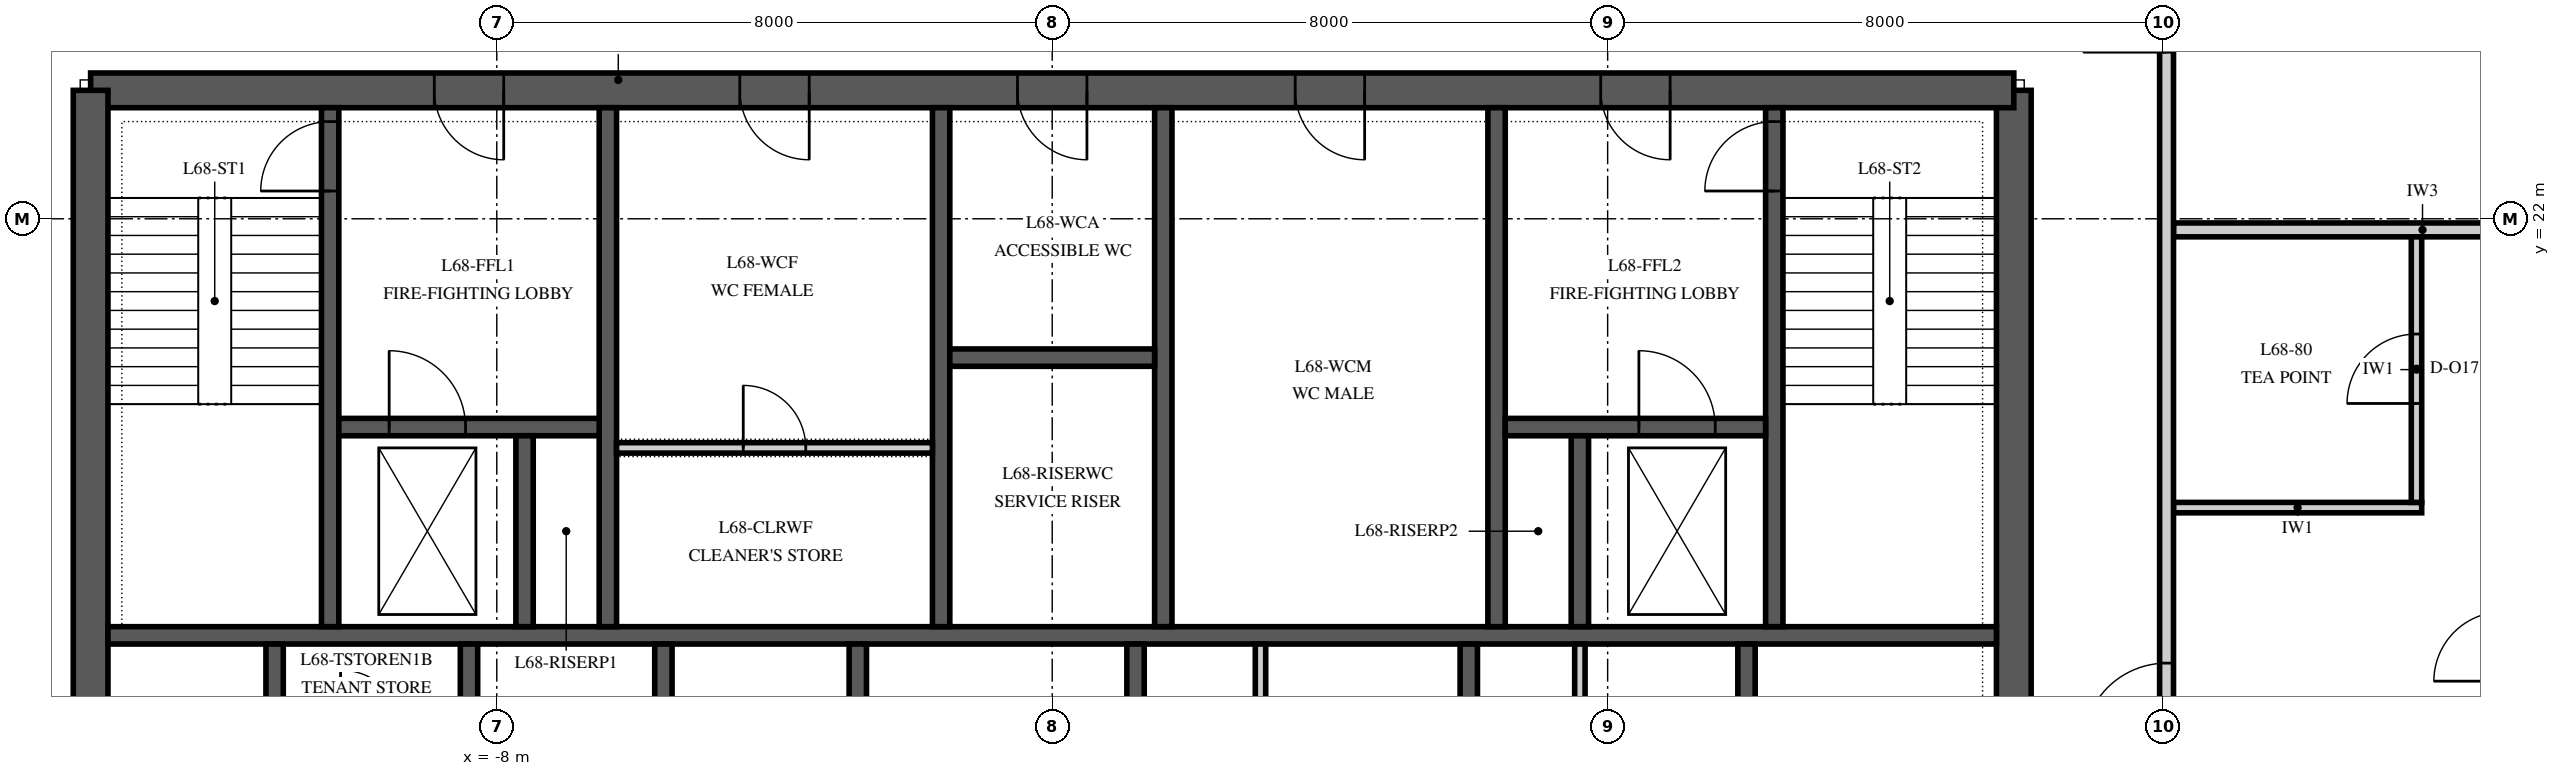
"""IFC4 building model, lengths in metres.
Left out: names, types, materials, properties, quantities, classifications, styles, units other than length and angle.
Written with IfcOpenShell. Run it as: python <this file> out.ifc"""

import sys

from ifc_helpers import new_model, si_unit, direction, frame, frame_2d, origin, place, context, subcontext, project, spatial, polyline, rectangle, outline, extrude, element, fill, save


model = new_model("IFC4")
c1 = context("Model", 3, precision=1e-05, world=origin(), true_north=direction((0.0, 1.0)))
c2 = subcontext(c1, "Body", "Model", "MODEL_VIEW")
j1 = project(units=[si_unit("LENGTHUNIT", "METRE"), si_unit("PLANEANGLEUNIT", "RADIAN")], contexts=[c1])
p1 = place(None, origin())
s1 = spatial("IfcSite", under=j1, at=p1, CompositionType="ELEMENT")
p2 = place(p1, origin())
s2 = spatial("IfcBuilding", under=s1, at=p2, CompositionType="ELEMENT")
p3 = place(p2, frame((0.0, 0.0, 292.0)))
s3 = spatial("IfcBuildingStorey", under=s2, at=p3, CompositionType="ELEMENT", Elevation=292.0)
p4 = place(p3, frame((13.85, 6.15, 0.0), z_axis=(0.0, 0.0, 1.0), x_axis=(0.0, 1.0, 0.0)))
e1 = element("IfcWall", 1, at=p4, inside=s3, PredefinedType="SHEAR", context=c2, shape_type="SweptSolid", body=[
    extrude(outline(polyline([(0.0, -0.25), (17.7, -0.25), (17.7, 0.0), (17.45, 0.0), (17.45, 0.25), (0.25, 0.25), (0.25, 0.0), (0.0, 0.0), (0.0, -0.25)])), origin(), (0.0, 0.0, 1.0), 4.0),
])
p5 = place(p4, frame((4.15, 0.0, 0.0)))
e2 = element("IfcOpeningElement", 2, at=p5, cuts=e1, PredefinedType="OPENING", context=c2, shape_type="SweptSolid", body=[
    extrude(rectangle(XDim=1.8, YDim=2.4, at=frame_2d((0.9, 1.2))), frame((0.0, 0.265, 0.0), z_axis=(0.0, -1.0, 0.0), x_axis=(1.0, 0.0, 0.0)), (0.0, 0.0, 1.0), 0.53),
])
p6 = place(p3, frame((13.85, 23.85, 0.0), z_axis=(0.0, 0.0, 1.0), x_axis=(-1.0, 0.0, 0.0)))
e3 = element("IfcWall", 3, at=p6, inside=s3, PredefinedType="SHEAR", context=c2, shape_type="SweptSolid", body=[
    extrude(rectangle(XDim=27.7, YDim=0.5, at=frame_2d((13.85, 0.0))), origin(), (0.0, 0.0, 1.0), 4.0),
])
p7 = place(p6, frame((21.75, 0.0, 0.0)))
e4 = element("IfcOpeningElement", 4, at=p7, cuts=e3, PredefinedType="OPENING", context=c2, shape_type="SweptSolid", body=[
    extrude(rectangle(XDim=1.0, YDim=2.1, at=frame_2d((0.5, 1.05))), frame((0.0, 0.265, 0.0), z_axis=(0.0, -1.0, 0.0), x_axis=(1.0, 0.0, 0.0)), (0.0, 0.0, 1.0), 0.53),
])
p8 = place(p6, frame((4.95, 0.0, 0.0)))
e5 = element("IfcOpeningElement", 5, at=p8, cuts=e3, PredefinedType="OPENING", context=c2, shape_type="SweptSolid", body=[
    extrude(rectangle(XDim=1.0, YDim=2.1, at=frame_2d((0.5, 1.05))), frame((0.0, 0.265, 0.0), z_axis=(0.0, -1.0, 0.0), x_axis=(1.0, 0.0, 0.0)), (0.0, 0.0, 1.0), 0.53),
])
p9 = place(p6, frame((17.35, 0.0, 0.0)))
e6 = element("IfcOpeningElement", 6, at=p9, cuts=e3, PredefinedType="OPENING", context=c2, shape_type="SweptSolid", body=[
    extrude(rectangle(XDim=1.0, YDim=2.1, at=frame_2d((0.5, 1.05))), frame((0.0, 0.265, 0.0), z_axis=(0.0, -1.0, 0.0), x_axis=(1.0, 0.0, 0.0)), (0.0, 0.0, 1.0), 0.53),
])
p10 = place(p6, frame((13.35, 0.0, 0.0)))
e7 = element("IfcOpeningElement", 7, at=p10, cuts=e3, PredefinedType="OPENING", context=c2, shape_type="SweptSolid", body=[
    extrude(rectangle(XDim=1.0, YDim=2.1, at=frame_2d((0.5, 1.05))), frame((0.0, 0.265, 0.0), z_axis=(0.0, -1.0, 0.0), x_axis=(1.0, 0.0, 0.0)), (0.0, 0.0, 1.0), 0.53),
])
p11 = place(p6, frame((9.35, 0.0, 0.0)))
e8 = element("IfcOpeningElement", 8, at=p11, cuts=e3, PredefinedType="OPENING", context=c2, shape_type="SweptSolid", body=[
    extrude(rectangle(XDim=1.0, YDim=2.1, at=frame_2d((0.5, 1.05))), frame((0.0, 0.265, 0.0), z_axis=(0.0, -1.0, 0.0), x_axis=(1.0, 0.0, 0.0)), (0.0, 0.0, 1.0), 0.53),
])
p12 = place(p3, frame((-13.85, 23.85, 0.0), z_axis=(0.0, 0.0, 1.0), x_axis=(0.0, -1.0, 0.0)))
e9 = element("IfcWall", 9, at=p12, inside=s3, PredefinedType="SHEAR", context=c2, shape_type="SweptSolid", body=[
    extrude(outline(polyline([(0.0, -0.25), (17.7, -0.25), (17.7, 0.0), (17.45, 0.0), (17.45, 0.25), (0.25, 0.25), (0.25, 0.0), (0.0, 0.0), (0.0, -0.25)])), origin(), (0.0, 0.0, 1.0), 4.0),
])
p13 = place(p12, frame((11.75, 0.0, 0.0)))
e10 = element("IfcOpeningElement", 10, at=p13, cuts=e9, PredefinedType="OPENING", context=c2, shape_type="SweptSolid", body=[
    extrude(rectangle(XDim=1.8, YDim=2.4, at=frame_2d((0.9, 1.2))), frame((0.0, 0.265, 0.0), z_axis=(0.0, -1.0, 0.0), x_axis=(1.0, 0.0, 0.0)), (0.0, 0.0, 1.0), 0.53),
])
p14 = place(p3, frame((-13.6, 16.0, 0.0), z_axis=(0.0, 0.0, 1.0), x_axis=(1.0, 0.0, 0.0)))
e11 = element("IfcWall", 11, at=p14, inside=s3, PredefinedType="SHEAR", context=c2, shape_type="SweptSolid", body=[
    extrude(rectangle(XDim=27.2, YDim=0.25, at=frame_2d((13.6, 0.0))), origin(), (0.0, 0.0, 1.0), 4.0),
])
for number, where, z_axis, x_axis in (
    (12, (-11.2, 13.125, 0.0), (0.0, 0.0, 1.0), (0.0, 1.0, 0.0)),
    (13, (-8.4, 13.125, 0.0), (0.0, 0.0, 1.0), (0.0, 1.0, 0.0)),
    (14, (-5.6, 13.125, 0.0), (0.0, 0.0, 1.0), (0.0, 1.0, 0.0)),
    (15, (-2.8, 13.125, 0.0), (0.0, 0.0, 1.0), (0.0, 1.0, 0.0)),
    (16, (1.2, 13.125, 0.0), (0.0, 0.0, 1.0), (0.0, 1.0, 0.0)),
    (17, (6.0, 13.125, 0.0), (0.0, 0.0, 1.0), (0.0, 1.0, 0.0)),
    (18, (10.0, 13.125, 0.0), (0.0, 0.0, 1.0), (0.0, 1.0, 0.0)),
):
    element("IfcWall", number, at=place(p3, frame(where, z_axis=z_axis, x_axis=x_axis)), inside=s3, PredefinedType="SHEAR", context=c2, shape_type="SweptSolid", body=[
        extrude(rectangle(XDim=2.75, YDim=0.25, at=frame_2d((1.375, 0.0))), origin(), (0.0, 0.0, 1.0), 4.0),
    ])
p15 = place(p3, frame((-10.4, 16.125, 0.0), z_axis=(0.0, 0.0, 1.0), x_axis=(0.0, 1.0, 0.0)))
e19 = element("IfcWall", 19, at=p15, inside=s3, PredefinedType="SHEAR", context=c2, shape_type="SweptSolid", body=[
    extrude(rectangle(XDim=7.475, YDim=0.25, at=frame_2d((3.738, 0.0))), origin(), (0.0, 0.0, 1.0), 4.0),
])
p16 = place(p15, frame((6.275, 0.0, 0.0)))
e20 = element("IfcOpeningElement", 20, at=p16, cuts=e19, PredefinedType="OPENING", context=c2, shape_type="SweptSolid", body=[
    extrude(rectangle(XDim=1.0, YDim=2.1, at=frame_2d((0.5, 1.05))), frame((0.0, 0.14, 0.0), z_axis=(0.0, -1.0, 0.0), x_axis=(1.0, 0.0, 0.0)), (0.0, 0.0, 1.0), 0.28),
])
for number, where, z_axis, x_axis in (
    (21, (-6.4, 16.125, 0.0), (0.0, 0.0, 1.0), (0.0, 1.0, 0.0)),
    (22, (-1.6, 16.125, 0.0), (0.0, 0.0, 1.0), (0.0, 1.0, 0.0)),
    (23, (1.6, 16.125, 0.0), (0.0, 0.0, 1.0), (0.0, 1.0, 0.0)),
    (24, (6.4, 16.125, 0.0), (0.0, 0.0, 1.0), (0.0, 1.0, 0.0)),
):
    element("IfcWall", number, at=place(p3, frame(where, z_axis=z_axis, x_axis=x_axis)), inside=s3, PredefinedType="SHEAR", context=c2, shape_type="SweptSolid", body=[
        extrude(rectangle(XDim=7.475, YDim=0.25, at=frame_2d((3.738, 0.0))), origin(), (0.0, 0.0, 1.0), 4.0),
    ])
p17 = place(p3, frame((10.4, 16.125, 0.0), z_axis=(0.0, 0.0, 1.0), x_axis=(0.0, 1.0, 0.0)))
e25 = element("IfcWall", 25, at=p17, inside=s3, PredefinedType="SHEAR", context=c2, shape_type="SweptSolid", body=[
    extrude(rectangle(XDim=7.475, YDim=0.25, at=frame_2d((3.738, 0.0))), origin(), (0.0, 0.0, 1.0), 4.0),
])
p18 = place(p17, frame((6.275, 0.0, 0.0)))
e26 = element("IfcOpeningElement", 26, at=p18, cuts=e25, PredefinedType="OPENING", context=c2, shape_type="SweptSolid", body=[
    extrude(rectangle(XDim=1.0, YDim=2.1, at=frame_2d((0.5, 1.05))), frame((0.0, 0.14, 0.0), z_axis=(0.0, -1.0, 0.0), x_axis=(1.0, 0.0, 0.0)), (0.0, 0.0, 1.0), 0.28),
])
p19 = place(p3, frame((-10.275, 19.0, 0.0), z_axis=(0.0, 0.0, 1.0), x_axis=(1.0, 0.0, 0.0)))
e27 = element("IfcWall", 27, at=p19, inside=s3, PredefinedType="SHEAR", context=c2, shape_type="SweptSolid", body=[
    extrude(rectangle(XDim=3.75, YDim=0.25, at=frame_2d((1.875, 0.0))), origin(), (0.0, 0.0, 1.0), 4.0),
])
p20 = place(p19, frame((0.725, 0.0, 0.0)))
e28 = element("IfcOpeningElement", 28, at=p20, cuts=e27, PredefinedType="OPENING", context=c2, shape_type="SweptSolid", body=[
    extrude(rectangle(XDim=1.1, YDim=2.1, at=frame_2d((0.55, 1.05))), frame((0.0, 0.14, 0.0), z_axis=(0.0, -1.0, 0.0), x_axis=(1.0, 0.0, 0.0)), (0.0, 0.0, 1.0), 0.28),
])
p21 = place(p3, frame((6.525, 19.0, 0.0), z_axis=(0.0, 0.0, 1.0), x_axis=(1.0, 0.0, 0.0)))
e29 = element("IfcWall", 29, at=p21, inside=s3, PredefinedType="SHEAR", context=c2, shape_type="SweptSolid", body=[
    extrude(rectangle(XDim=3.75, YDim=0.25, at=frame_2d((1.875, 0.0))), origin(), (0.0, 0.0, 1.0), 4.0),
])
p22 = place(p21, frame((1.925, 0.0, 0.0)))
e30 = element("IfcOpeningElement", 30, at=p22, cuts=e29, PredefinedType="OPENING", context=c2, shape_type="SweptSolid", body=[
    extrude(rectangle(XDim=1.1, YDim=2.1, at=frame_2d((0.55, 1.05))), frame((0.0, 0.14, 0.0), z_axis=(0.0, -1.0, 0.0), x_axis=(1.0, 0.0, 0.0)), (0.0, 0.0, 1.0), 0.28),
])
for number, where, z_axis, x_axis in (
    (31, (-7.6, 16.125, 0.0), (0.0, 0.0, 1.0), (0.0, 1.0, 0.0)),
    (32, (7.6, 16.125, 0.0), (0.0, 0.0, 1.0), (0.0, 1.0, 0.0)),
):
    element("IfcWall", number, at=place(p3, frame(where, z_axis=z_axis, x_axis=x_axis)), inside=s3, PredefinedType="SHEAR", context=c2, shape_type="SweptSolid", body=[
        extrude(rectangle(XDim=2.75, YDim=0.25, at=frame_2d((1.375, 0.0))), origin(), (0.0, 0.0, 1.0), 4.0),
    ])
p23 = place(p3, frame((-1.475, 20.0, 0.0), z_axis=(0.0, 0.0, 1.0), x_axis=(1.0, 0.0, 0.0)))
e33 = element("IfcWall", 33, at=p23, inside=s3, PredefinedType="SHEAR", context=c2, shape_type="SweptSolid", body=[
    extrude(rectangle(XDim=2.95, YDim=0.25, at=frame_2d((1.475, 0.0))), origin(), (0.0, 0.0, 1.0), 4.0),
])
p24 = place(p3, frame((-6.275, 18.7, 0.0), z_axis=(0.0, 0.0, 1.0), x_axis=(1.0, 0.0, 0.0)))
e34 = element("IfcWall", 34, at=p24, inside=s3, PredefinedType="PARTITIONING", context=c2, shape_type="SweptSolid", body=[
    extrude(rectangle(XDim=4.55, YDim=0.15, at=frame_2d((2.275, 0.0))), origin(), (0.0, 0.0, 1.0), 3.85),
])
p25 = place(p24, frame((1.825, 0.0, 0.0)))
e35 = element("IfcOpeningElement", 35, at=p25, cuts=e34, PredefinedType="OPENING", context=c2, shape_type="SweptSolid", body=[
    extrude(rectangle(XDim=0.9, YDim=2.1, at=frame_2d((0.45, 1.05))), frame((0.0, 0.09, 0.0), z_axis=(0.0, -1.0, 0.0), x_axis=(1.0, 0.0, 0.0)), (0.0, 0.0, 1.0), 0.18),
])
for number, where, z_axis, x_axis in (
    (36, (3.0, 13.125, 0.0), (0.0, 0.0, 1.0), (0.0, 1.0, 0.0)),
    (37, (7.6, 13.125, 0.0), (0.0, 0.0, 1.0), (0.0, 1.0, 0.0)),
):
    element("IfcWall", number, at=place(p3, frame(where, z_axis=z_axis, x_axis=x_axis)), inside=s3, PredefinedType="PARTITIONING", context=c2, shape_type="SweptSolid", body=[
        extrude(rectangle(XDim=2.75, YDim=0.15, at=frame_2d((1.375, 0.0))), origin(), (0.0, 0.0, 1.0), 3.85),
    ])
p26 = place(p3, frame((16.15, 17.84, 0.0), z_axis=(0.0, 0.0, 1.0), x_axis=(1.0, 0.0, 0.0)))
e38 = element("IfcWall", 38, at=p26, inside=s3, PredefinedType="PARTITIONING", context=c2, shape_type="SweptSolid", body=[
    extrude(rectangle(XDim=3.575, YDim=0.15, at=frame_2d((1.788, 0.0))), origin(), (0.0, 0.0, 1.0), 3.23),
])
p27 = place(p3, frame((16.15, 21.84, 0.0), z_axis=(0.0, 0.0, 1.0), x_axis=(1.0, 0.0, 0.0)))
e39 = element("IfcWall", 39, at=p27, inside=s3, PredefinedType="PARTITIONING", context=c2, shape_type="SweptSolid", body=[
    extrude(rectangle(XDim=7.174, YDim=0.2, at=frame_2d((3.587, 0.0))), origin(), (0.0, 0.0, 1.0), 3.23),
])
p28 = place(p3, frame((16.05, 4.05, 0.0), z_axis=(0.0, 0.0, 1.0), x_axis=(0.0, 1.0, 0.0)))
e40 = element("IfcWall", 40, at=p28, inside=s3, PredefinedType="PARTITIONING", context=c2, shape_type="SweptSolid", body=[
    extrude(rectangle(XDim=21.9, YDim=0.2, at=frame_2d((10.95, 0.0))), origin(), (0.0, 0.0, 1.0), 2.842),
])
p29 = place(p28, frame((20.35, 0.0, 0.0)))
e41 = element("IfcOpeningElement", 41, at=p29, cuts=e40, PredefinedType="OPENING", context=c2, shape_type="SweptSolid", body=[
    extrude(rectangle(XDim=1.2, YDim=2.4, at=frame_2d((0.6, 1.2))), frame((0.0, 0.115, 0.0), z_axis=(0.0, -1.0, 0.0), x_axis=(1.0, 0.0, 0.0)), (0.0, 0.0, 1.0), 0.23),
])
p30 = place(p28, frame((10.35, 0.0, 0.0)))
e42 = element("IfcOpeningElement", 42, at=p30, cuts=e40, PredefinedType="OPENING", context=c2, shape_type="SweptSolid", body=[
    extrude(rectangle(XDim=1.2, YDim=2.4, at=frame_2d((0.6, 1.2))), frame((0.0, 0.115, 0.0), z_axis=(0.0, -1.0, 0.0), x_axis=(1.0, 0.0, 0.0)), (0.0, 0.0, 1.0), 0.23),
])
p31 = place(p3, frame((19.65, 17.915, 0.0), z_axis=(0.0, 0.0, 1.0), x_axis=(0.0, 1.0, 0.0)))
e43 = element("IfcWall", 43, at=p31, inside=s3, PredefinedType="PARTITIONING", context=c2, shape_type="SweptSolid", body=[
    extrude(rectangle(XDim=3.825, YDim=0.15, at=frame_2d((1.913, 0.0))), origin(), (0.0, 0.0, 1.0), 3.23),
])
p32 = place(p31, frame((1.425, 0.0, 0.0)))
e44 = element("IfcOpeningElement", 44, at=p32, cuts=e43, PredefinedType="OPENING", context=c2, shape_type="SweptSolid", body=[
    extrude(rectangle(XDim=1.0, YDim=2.3, at=frame_2d((0.5, 1.15))), frame((0.0, 0.09, 0.0), z_axis=(0.0, -1.0, 0.0), x_axis=(1.0, 0.0, 0.0)), (0.0, 0.0, 1.0), 0.18),
])
p33 = place(p7, origin())
e45 = element("IfcDoor", 45, at=p33, inside=s3, OperationType="SINGLE_SWING_RIGHT", PredefinedType="DOOR", context=c2, shape_type="SweptSolid", body=[
    extrude(rectangle(XDim=1.0, YDim=2.1, at=frame_2d((0.5, 1.05))), frame((0.0, 0.25, 0.0), z_axis=(0.0, -1.0, 0.0), x_axis=(1.0, 0.0, 0.0)), (0.0, 0.0, 1.0), 0.5),
])
fill(e4, e45)
p34 = place(p8, origin())
e46 = element("IfcDoor", 46, at=p34, inside=s3, OperationType="SINGLE_SWING_RIGHT", PredefinedType="DOOR", context=c2, shape_type="SweptSolid", body=[
    extrude(rectangle(XDim=1.0, YDim=2.1, at=frame_2d((0.5, 1.05))), frame((0.0, 0.25, 0.0), z_axis=(0.0, -1.0, 0.0), x_axis=(1.0, 0.0, 0.0)), (0.0, 0.0, 1.0), 0.5),
])
fill(e5, e46)
p35 = place(p9, origin())
e47 = element("IfcDoor", 47, at=p35, inside=s3, OperationType="SINGLE_SWING_LEFT", PredefinedType="DOOR", context=c2, shape_type="SweptSolid", body=[
    extrude(rectangle(XDim=1.0, YDim=2.1, at=frame_2d((0.5, 1.05))), frame((0.0, 0.25, 0.0), z_axis=(0.0, -1.0, 0.0), x_axis=(1.0, 0.0, 0.0)), (0.0, 0.0, 1.0), 0.5),
])
fill(e6, e47)
p36 = place(p10, origin())
e48 = element("IfcDoor", 48, at=p36, inside=s3, OperationType="SINGLE_SWING_LEFT", PredefinedType="DOOR", context=c2, shape_type="SweptSolid", body=[
    extrude(rectangle(XDim=1.0, YDim=2.1, at=frame_2d((0.5, 1.05))), frame((0.0, 0.25, 0.0), z_axis=(0.0, -1.0, 0.0), x_axis=(1.0, 0.0, 0.0)), (0.0, 0.0, 1.0), 0.5),
])
fill(e7, e48)
p37 = place(p11, origin())
e49 = element("IfcDoor", 49, at=p37, inside=s3, OperationType="SINGLE_SWING_LEFT", PredefinedType="DOOR", context=c2, shape_type="SweptSolid", body=[
    extrude(rectangle(XDim=1.0, YDim=2.1, at=frame_2d((0.5, 1.05))), frame((0.0, 0.25, 0.0), z_axis=(0.0, -1.0, 0.0), x_axis=(1.0, 0.0, 0.0)), (0.0, 0.0, 1.0), 0.5),
])
fill(e8, e49)
p38 = place(p16, origin())
e50 = element("IfcDoor", 50, at=p38, inside=s3, OperationType="SINGLE_SWING_LEFT", PredefinedType="DOOR", context=c2, shape_type="SweptSolid", body=[
    extrude(rectangle(XDim=1.0, YDim=2.1, at=frame_2d((0.5, 1.05))), frame((0.0, 0.125, 0.0), z_axis=(0.0, -1.0, 0.0), x_axis=(1.0, 0.0, 0.0)), (0.0, 0.0, 1.0), 0.25),
])
fill(e20, e50)
p39 = place(p18, origin())
e51 = element("IfcDoor", 51, at=p39, inside=s3, OperationType="SINGLE_SWING_LEFT", PredefinedType="DOOR", context=c2, shape_type="SweptSolid", body=[
    extrude(rectangle(XDim=1.0, YDim=2.1, at=frame_2d((0.5, 1.05))), frame((0.0, 0.125, 0.0), z_axis=(0.0, -1.0, 0.0), x_axis=(1.0, 0.0, 0.0)), (0.0, 0.0, 1.0), 0.25),
])
fill(e26, e51)
p40 = place(p22, origin())
e52 = element("IfcDoor", 52, at=p40, inside=s3, OperationType="SLIDING_TO_RIGHT", PredefinedType="DOOR", context=c2, shape_type="SweptSolid", body=[
    extrude(rectangle(XDim=1.1, YDim=2.1, at=frame_2d((0.55, 1.05))), frame((0.0, 0.125, 0.0), z_axis=(0.0, -1.0, 0.0), x_axis=(1.0, 0.0, 0.0)), (0.0, 0.0, 1.0), 0.25),
])
fill(e30, e52)
p41 = place(p20, origin())
e53 = element("IfcDoor", 53, at=p41, inside=s3, OperationType="SLIDING_TO_RIGHT", PredefinedType="DOOR", context=c2, shape_type="SweptSolid", body=[
    extrude(rectangle(XDim=1.1, YDim=2.1, at=frame_2d((0.55, 1.05))), frame((0.0, 0.125, 0.0), z_axis=(0.0, -1.0, 0.0), x_axis=(1.0, 0.0, 0.0)), (0.0, 0.0, 1.0), 0.25),
])
fill(e28, e53)
p42 = place(p25, origin())
e54 = element("IfcDoor", 54, at=p42, inside=s3, OperationType="SINGLE_SWING_LEFT", PredefinedType="DOOR", context=c2, shape_type="SweptSolid", body=[
    extrude(rectangle(XDim=0.9, YDim=2.1, at=frame_2d((0.45, 1.05))), frame((0.0, 0.075, 0.0), z_axis=(0.0, -1.0, 0.0), x_axis=(1.0, 0.0, 0.0)), (0.0, 0.0, 1.0), 0.149),
])
fill(e35, e54)
p43 = place(p32, origin())
e55 = element("IfcDoor", 55, at=p43, inside=s3, OperationType="SINGLE_SWING_LEFT", PredefinedType="DOOR", context=c2, shape_type="SweptSolid", body=[
    extrude(rectangle(XDim=1.0, YDim=2.3, at=frame_2d((0.5, 1.15))), frame((0.0, 0.075, 0.0), z_axis=(0.0, -1.0, 0.0), x_axis=(1.0, 0.0, 0.0)), (0.0, 0.0, 1.0), 0.149),
])
fill(e44, e55)
p44 = place(p30, origin())
e56 = element("IfcDoor", 56, at=p44, inside=s3, OperationType="SINGLE_SWING_LEFT", PredefinedType="DOOR", context=c2, shape_type="SweptSolid", body=[
    extrude(rectangle(XDim=1.2, YDim=2.4, at=frame_2d((0.6, 1.2))), frame((0.0, 0.1, 0.0), z_axis=(0.0, -1.0, 0.0), x_axis=(1.0, 0.0, 0.0)), (0.0, 0.0, 1.0), 0.199),
])
fill(e42, e56)
save(model, sys.argv[1])
